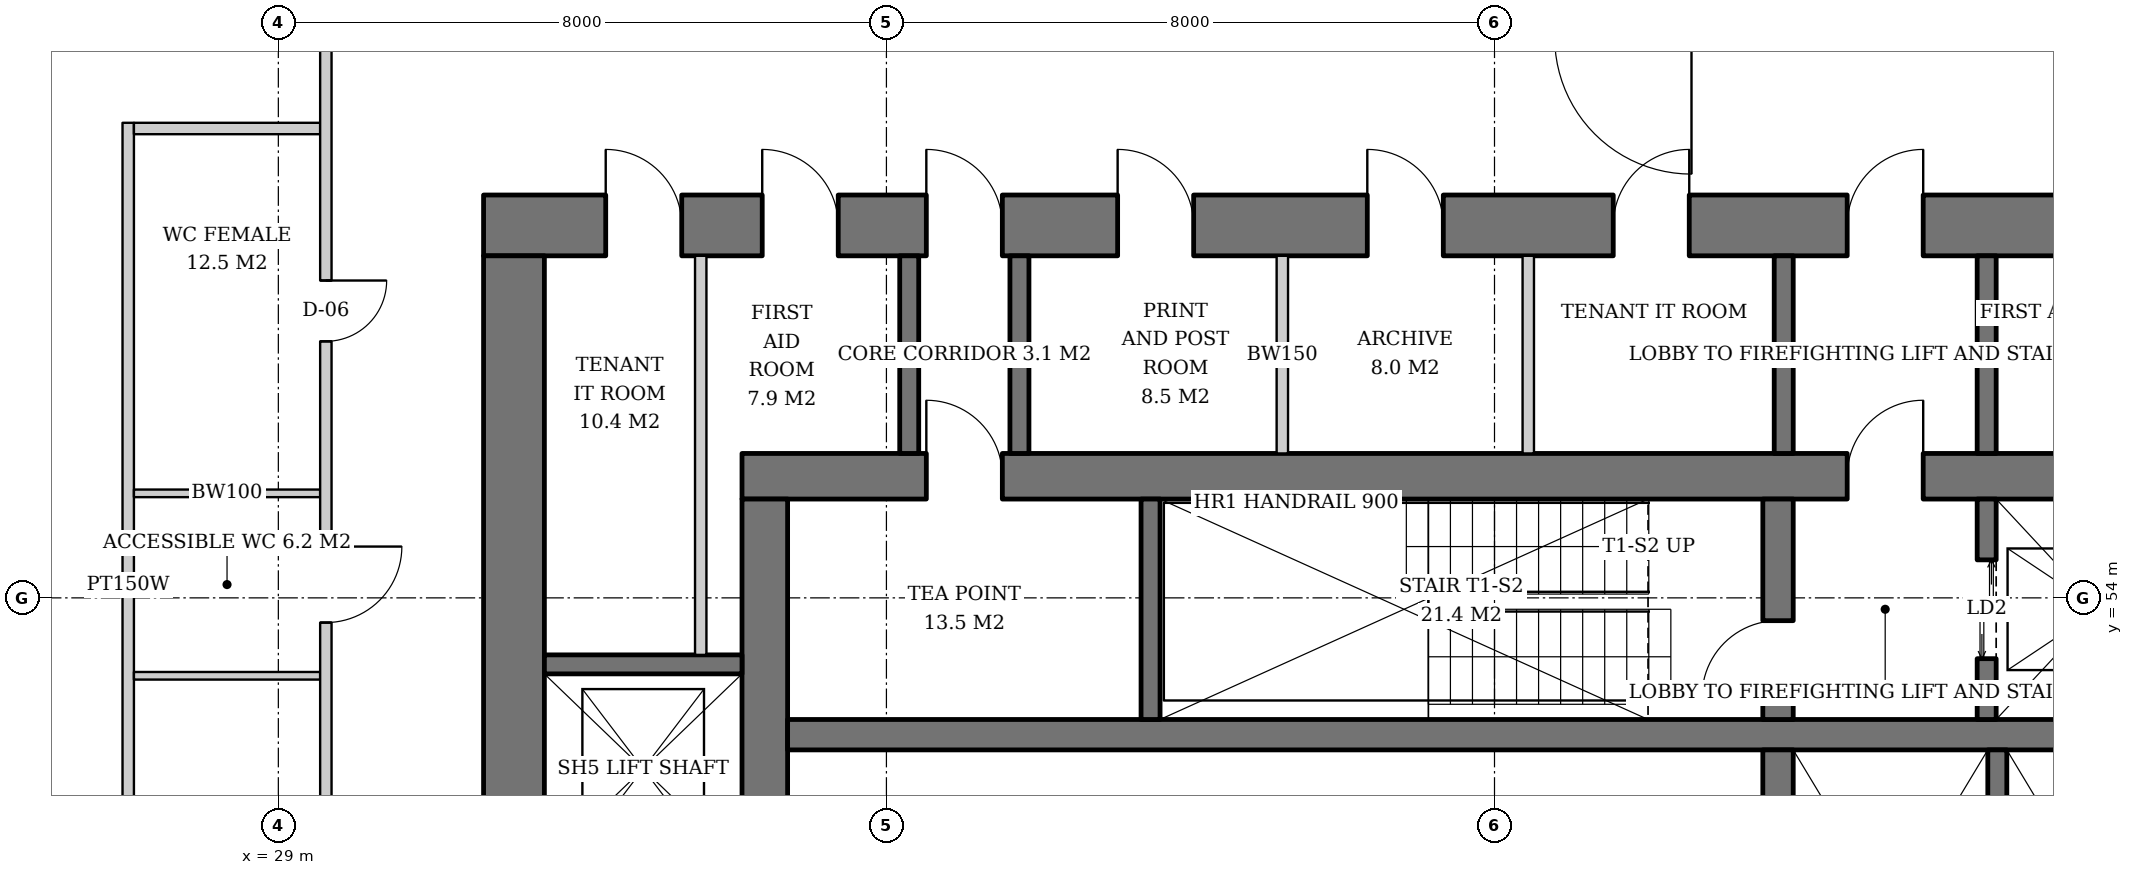
"""IFC4 building model, lengths in metres.
Left out: names, types, materials, properties, quantities, classifications, styles, units other than length and angle.
Written with IfcOpenShell. Run it as: python <this file> out.ifc"""

import sys

from ifc_helpers import new_model, si_unit, direction, frame, frame_2d, origin, place, context, subcontext, project, spatial, rectangle, extrude, element, fill, save


model = new_model("IFC4")
c1 = context("Model", 3, precision=1e-05, world=origin(), true_north=direction((0.0, 1.0)))
c2 = subcontext(c1, "Body", "Model", "MODEL_VIEW")
j1 = project(units=[si_unit("LENGTHUNIT", "METRE"), si_unit("PLANEANGLEUNIT", "RADIAN")], contexts=[c1])
p1 = place(None, origin())
s1 = spatial("IfcSite", under=j1, at=p1, CompositionType="ELEMENT")
p2 = place(p1, origin())
s2 = spatial("IfcBuilding", under=s1, at=p2, CompositionType="ELEMENT")
p3 = place(p2, frame((0.0, 0.0, 59.0)))
s3 = spatial("IfcBuildingStorey", under=s2, at=p3, CompositionType="ELEMENT", Elevation=59.0)
p4 = place(p3, frame((35.1, 55.6, 0.0), z_axis=(0.0, 0.0, 1.0), x_axis=(1.0, 0.0, 0.0)))
e1 = element("IfcWall", 1, at=p4, inside=s3, PredefinedType="SHEAR", context=c2, shape_type="SweptSolid", body=[
    extrude(rectangle(XDim=19.8, YDim=0.6, at=frame_2d((9.9, 0.0))), origin(), (0.0, 0.0, 1.0), 3.8),
])
p5 = place(p4, frame((14.54, 0.0, 0.0)))
e2 = element("IfcOpeningElement", 2, at=p5, cuts=e1, PredefinedType="OPENING", context=c2, shape_type="SweptSolid", body=[
    extrude(rectangle(XDim=1.0, YDim=2.1, at=frame_2d((0.5, 1.05))), frame((0.0, 0.31, 0.0), z_axis=(0.0, -1.0, 0.0), x_axis=(1.0, 0.0, 0.0)), (0.0, 0.0, 1.0), 0.62),
])
p6 = place(p4, frame((2.425, 0.0, 0.0)))
e3 = element("IfcOpeningElement", 3, at=p6, cuts=e1, PredefinedType="OPENING", context=c2, shape_type="SweptSolid", body=[
    extrude(rectangle(XDim=1.0, YDim=2.1, at=frame_2d((0.5, 1.05))), frame((0.0, 0.31, 0.0), z_axis=(0.0, -1.0, 0.0), x_axis=(1.0, 0.0, 0.0)), (0.0, 0.0, 1.0), 0.62),
])
p7 = place(p3, frame((35.4, 36.7, 0.0), z_axis=(0.0, 0.0, 1.0), x_axis=(0.0, 1.0, 0.0)))
e4 = element("IfcWall", 4, at=p7, inside=s3, PredefinedType="SHEAR", context=c2, shape_type="SweptSolid", body=[
    extrude(rectangle(XDim=18.6, YDim=0.6, at=frame_2d((9.3, 0.0))), origin(), (0.0, 0.0, 1.0), 3.8),
])
p8 = place(p7, frame((8.4, 0.0, 0.0)))
e5 = element("IfcOpeningElement", 5, at=p8, cuts=e4, PredefinedType="OPENING", context=c2, shape_type="SweptSolid", body=[
    extrude(rectangle(XDim=1.8, YDim=2.4, at=frame_2d((0.9, 1.2))), frame((0.0, 0.31, 0.0), z_axis=(0.0, -1.0, 0.0), x_axis=(1.0, 0.0, 0.0)), (0.0, 0.0, 1.0), 0.62),
])
p9 = place(p3, frame((31.7, 58.9, 0.0), z_axis=(0.0, 0.0, 1.0), x_axis=(1.0, 0.0, 0.0)))
e6 = element("IfcWall", 6, at=p9, inside=s3, PredefinedType="SHEAR", context=c2, shape_type="SweptSolid", body=[
    extrude(rectangle(XDim=26.6, YDim=0.8, at=frame_2d((13.3, 0.0))), origin(), (0.0, 0.0, 1.0), 3.8),
])
p10 = place(p9, frame((17.94, 0.0, 0.0)))
e7 = element("IfcOpeningElement", 7, at=p10, cuts=e6, PredefinedType="OPENING", context=c2, shape_type="SweptSolid", body=[
    extrude(rectangle(XDim=1.0, YDim=2.1, at=frame_2d((0.5, 1.05))), frame((0.0, 0.41, 0.0), z_axis=(0.0, -1.0, 0.0), x_axis=(1.0, 0.0, 0.0)), (0.0, 0.0, 1.0), 0.82),
])
p11 = place(p9, frame((5.825, 0.0, 0.0)))
e8 = element("IfcOpeningElement", 8, at=p11, cuts=e6, PredefinedType="OPENING", context=c2, shape_type="SweptSolid", body=[
    extrude(rectangle(XDim=1.0, YDim=2.1, at=frame_2d((0.5, 1.05))), frame((0.0, 0.41, 0.0), z_axis=(0.0, -1.0, 0.0), x_axis=(1.0, 0.0, 0.0)), (0.0, 0.0, 1.0), 0.82),
])
p12 = place(p9, frame((1.607, 0.0, 0.0)))
e9 = element("IfcOpeningElement", 9, at=p12, cuts=e6, PredefinedType="OPENING", context=c2, shape_type="SweptSolid", body=[
    extrude(rectangle(XDim=1.0, YDim=2.1, at=frame_2d((0.5, 1.05))), frame((0.0, 0.41, 0.0), z_axis=(0.0, -1.0, 0.0), x_axis=(1.0, 0.0, 0.0)), (0.0, 0.0, 1.0), 0.82),
])
p13 = place(p9, frame((3.666, 0.0, 0.0)))
e10 = element("IfcOpeningElement", 10, at=p13, cuts=e6, PredefinedType="OPENING", context=c2, shape_type="SweptSolid", body=[
    extrude(rectangle(XDim=1.0, YDim=2.1, at=frame_2d((0.5, 1.05))), frame((0.0, 0.41, 0.0), z_axis=(0.0, -1.0, 0.0), x_axis=(1.0, 0.0, 0.0)), (0.0, 0.0, 1.0), 0.82),
])
p14 = place(p9, frame((8.342, 0.0, 0.0)))
e11 = element("IfcOpeningElement", 11, at=p14, cuts=e6, PredefinedType="OPENING", context=c2, shape_type="SweptSolid", body=[
    extrude(rectangle(XDim=1.0, YDim=2.1, at=frame_2d((0.5, 1.05))), frame((0.0, 0.41, 0.0), z_axis=(0.0, -1.0, 0.0), x_axis=(1.0, 0.0, 0.0)), (0.0, 0.0, 1.0), 0.82),
])
p15 = place(p9, frame((11.626, 0.0, 0.0)))
e12 = element("IfcOpeningElement", 12, at=p15, cuts=e6, PredefinedType="OPENING", context=c2, shape_type="SweptSolid", body=[
    extrude(rectangle(XDim=1.0, YDim=2.1, at=frame_2d((0.5, 1.05))), frame((0.0, 0.41, 0.0), z_axis=(0.0, -1.0, 0.0), x_axis=(1.0, 0.0, 0.0)), (0.0, 0.0, 1.0), 0.82),
])
p16 = place(p9, frame((14.862, 0.0, 0.0)))
e13 = element("IfcOpeningElement", 13, at=p16, cuts=e6, PredefinedType="OPENING", context=c2, shape_type="SweptSolid", body=[
    extrude(rectangle(XDim=1.0, YDim=2.1, at=frame_2d((0.5, 1.05))), frame((0.0, 0.41, 0.0), z_axis=(0.0, -1.0, 0.0), x_axis=(1.0, 0.0, 0.0)), (0.0, 0.0, 1.0), 0.82),
])
p17 = place(p9, frame((20.875, 0.0, 0.0)))
e14 = element("IfcOpeningElement", 14, at=p17, cuts=e6, PredefinedType="OPENING", context=c2, shape_type="SweptSolid", body=[
    extrude(rectangle(XDim=1.0, YDim=2.1, at=frame_2d((0.5, 1.05))), frame((0.0, 0.41, 0.0), z_axis=(0.0, -1.0, 0.0), x_axis=(1.0, 0.0, 0.0)), (0.0, 0.0, 1.0), 0.82),
])
p18 = place(p9, frame((23.7, 0.0, 0.0)))
e15 = element("IfcOpeningElement", 15, at=p18, cuts=e6, PredefinedType="OPENING", context=c2, shape_type="SweptSolid", body=[
    extrude(rectangle(XDim=1.0, YDim=2.1, at=frame_2d((0.5, 1.05))), frame((0.0, 0.41, 0.0), z_axis=(0.0, -1.0, 0.0), x_axis=(1.0, 0.0, 0.0)), (0.0, 0.0, 1.0), 0.82),
])
p19 = place(p3, frame((32.1, 33.5, 0.0), z_axis=(0.0, 0.0, 1.0), x_axis=(0.0, 1.0, 0.0)))
e16 = element("IfcWall", 16, at=p19, inside=s3, PredefinedType="SHEAR", context=c2, shape_type="SweptSolid", body=[
    extrude(rectangle(XDim=25.0, YDim=0.8, at=frame_2d((12.5, 0.0))), origin(), (0.0, 0.0, 1.0), 3.8),
])
p20 = place(p19, frame((11.6, 0.0, 0.0)))
e17 = element("IfcOpeningElement", 17, at=p20, cuts=e16, PredefinedType="OPENING", context=c2, shape_type="SweptSolid", body=[
    extrude(rectangle(XDim=1.8, YDim=2.4, at=frame_2d((0.9, 1.2))), frame((0.0, 0.41, 0.0), z_axis=(0.0, -1.0, 0.0), x_axis=(1.0, 0.0, 0.0)), (0.0, 0.0, 1.0), 0.82),
])
p21 = place(p3, frame((35.7, 52.2, 0.0), z_axis=(0.0, 0.0, 1.0), x_axis=(1.0, 0.0, 0.0)))
e18 = element("IfcWall", 18, at=p21, inside=s3, PredefinedType="SHEAR", context=c2, shape_type="SweptSolid", body=[
    extrude(rectangle(XDim=18.6, YDim=0.4, at=frame_2d((9.3, 0.0))), origin(), (0.0, 0.0, 1.0), 3.8),
])
p22 = place(p3, frame((48.73, 40.0, 0.0), z_axis=(0.0, 0.0, 1.0), x_axis=(0.0, 1.0, 0.0)))
e19 = element("IfcWall", 19, at=p22, inside=s3, PredefinedType="SHEAR", context=c2, shape_type="SweptSolid", body=[
    extrude(rectangle(XDim=12.0, YDim=0.4, at=frame_2d((6.0, 0.0))), origin(), (0.0, 0.0, 1.0), 3.8),
])
p23 = place(p3, frame((48.73, 52.4, 0.0), z_axis=(0.0, 0.0, 1.0), x_axis=(0.0, 1.0, 0.0)))
e20 = element("IfcWall", 20, at=p23, inside=s3, PredefinedType="SHEAR", context=c2, shape_type="SweptSolid", body=[
    extrude(rectangle(XDim=2.9, YDim=0.4, at=frame_2d((1.45, 0.0))), origin(), (0.0, 0.0, 1.0), 3.8),
])
p24 = place(p23, frame((0.3, 0.0, 0.0)))
e21 = element("IfcOpeningElement", 21, at=p24, cuts=e20, PredefinedType="OPENING", context=c2, shape_type="SweptSolid", body=[
    extrude(rectangle(XDim=1.0, YDim=2.1, at=frame_2d((0.5, 1.05))), frame((0.0, 0.21, 0.0), z_axis=(0.0, -1.0, 0.0), x_axis=(1.0, 0.0, 0.0)), (0.0, 0.0, 1.0), 0.42),
])
p25 = place(p3, frame((40.475, 52.4, 0.0), z_axis=(0.0, 0.0, 1.0), x_axis=(0.0, 1.0, 0.0)))
e22 = element("IfcWall", 22, at=p25, inside=s3, PredefinedType="SHEAR", context=c2, shape_type="SweptSolid", body=[
    extrude(rectangle(XDim=2.9, YDim=0.25, at=frame_2d((1.45, 0.0))), origin(), (0.0, 0.0, 1.0), 3.8),
])
p26 = place(p3, frame((51.475, 52.4, 0.0), z_axis=(0.0, 0.0, 1.0), x_axis=(0.0, 1.0, 0.0)))
e23 = element("IfcWall", 23, at=p26, inside=s3, PredefinedType="SHEAR", context=c2, shape_type="SweptSolid", body=[
    extrude(rectangle(XDim=2.9, YDim=0.25, at=frame_2d((1.45, 0.0))), origin(), (0.0, 0.0, 1.0), 3.8),
])
p27 = place(p26, frame((0.8, 0.0, 0.0)))
e24 = element("IfcOpeningElement", 24, at=p27, cuts=e23, PredefinedType="OPENING", context=c2, shape_type="SweptSolid", body=[
    extrude(rectangle(XDim=1.3, YDim=2.2, at=frame_2d((0.65, 1.1))), frame((0.0, 0.135, 0.0), z_axis=(0.0, -1.0, 0.0), x_axis=(1.0, 0.0, 0.0)), (0.0, 0.0, 1.0), 0.27),
])
p28 = place(p3, frame((51.615, 47.75, 0.0), z_axis=(0.0, 0.0, 1.0), x_axis=(0.0, 1.0, 0.0)))
e25 = element("IfcWall", 25, at=p28, inside=s3, PredefinedType="SHEAR", context=c2, shape_type="SweptSolid", body=[
    extrude(rectangle(XDim=4.25, YDim=0.25, at=frame_2d((2.125, 0.0))), origin(), (0.0, 0.0, 1.0), 3.8),
])
p29 = place(p3, frame((32.5, 53.125, 0.0), z_axis=(0.0, 0.0, 1.0), x_axis=(1.0, 0.0, 0.0)))
e26 = element("IfcWall", 26, at=p29, inside=s3, PredefinedType="SHEAR", context=c2, shape_type="SweptSolid", body=[
    extrude(rectangle(XDim=2.6, YDim=0.25, at=frame_2d((1.3, 0.0))), origin(), (0.0, 0.0, 1.0), 3.8),
])
for number, where, z_axis, x_axis in (
    (27, (48.805, 55.9, 0.0), (0.0, 0.0, 1.0), (0.0, 1.0, 0.0)),
    (28, (51.475, 55.9, 0.0), (0.0, 0.0, 1.0), (0.0, 1.0, 0.0)),
    (29, (37.3, 55.9, 0.0), (0.0, 0.0, 1.0), (0.0, 1.0, 0.0)),
    (30, (38.75, 55.9, 0.0), (0.0, 0.0, 1.0), (0.0, 1.0, 0.0)),
):
    element("IfcWall", number, at=place(p3, frame(where, z_axis=z_axis, x_axis=x_axis)), inside=s3, PredefinedType="SOLIDWALL", context=c2, shape_type="SweptSolid", body=[
        extrude(rectangle(XDim=2.6, YDim=0.25, at=frame_2d((1.3, 0.0))), origin(), (0.0, 0.0, 1.0), 3.62),
    ])
p30 = place(p3, frame((34.557, 53.25, 0.0), z_axis=(0.0, 0.0, 1.0), x_axis=(0.0, 1.0, 0.0)))
e31 = element("IfcWall", 31, at=p30, inside=s3, PredefinedType="SOLIDWALL", context=c2, shape_type="SweptSolid", body=[
    extrude(rectangle(XDim=5.25, YDim=0.15, at=frame_2d((2.625, 0.0))), origin(), (0.0, 0.0, 1.0), 3.62),
])
for number, where, z_axis, x_axis in (
    (32, (42.209, 55.9, 0.0), (0.0, 0.0, 1.0), (0.0, 1.0, 0.0)),
    (33, (45.444, 55.9, 0.0), (0.0, 0.0, 1.0), (0.0, 1.0, 0.0)),
):
    element("IfcWall", number, at=place(p3, frame(where, z_axis=z_axis, x_axis=x_axis)), inside=s3, PredefinedType="SOLIDWALL", context=c2, shape_type="SweptSolid", body=[
        extrude(rectangle(XDim=2.6, YDim=0.15, at=frame_2d((1.3, 0.0))), origin(), (0.0, 0.0, 1.0), 3.62),
    ])
p31 = place(p3, frame((27.025, 60.25, 0.0), z_axis=(0.0, 0.0, 1.0), x_axis=(0.0, -1.0, 0.0)))
e34 = element("IfcWall", 34, at=p31, inside=s3, PredefinedType="PARTITIONING", context=c2, shape_type="SweptSolid", body=[
    extrude(rectangle(XDim=12.15, YDim=0.15, at=frame_2d((6.075, 0.0))), origin(), (0.0, 0.0, 1.0), 2.612),
])
p32 = place(p3, frame((29.55, 60.175, 0.0), z_axis=(0.0, 0.0, 1.0), x_axis=(-1.0, 0.0, 0.0)))
e35 = element("IfcWall", 35, at=p32, inside=s3, PredefinedType="PARTITIONING", context=c2, shape_type="SweptSolid", body=[
    extrude(rectangle(XDim=2.45, YDim=0.15, at=frame_2d((1.225, 0.0))), origin(), (0.0, 0.0, 1.0), 3.62),
])
for number, where, z_axis, x_axis in (
    (36, (29.55, 55.375, 0.0), (0.0, 0.0, 1.0), (-1.0, 0.0, 0.0)),
    (37, (29.55, 52.975, 0.0), (0.0, 0.0, 1.0), (-1.0, 0.0, 0.0)),
):
    element("IfcWall", number, at=place(p3, frame(where, z_axis=z_axis, x_axis=x_axis)), inside=s3, PredefinedType="SOLIDWALL", context=c2, shape_type="SweptSolid", body=[
        extrude(rectangle(XDim=2.45, YDim=0.1, at=frame_2d((1.225, 0.0))), origin(), (0.0, 0.0, 1.0), 3.62),
    ])
p33 = place(p3, frame((29.625, 61.45, 0.0), z_axis=(0.0, 0.0, 1.0), x_axis=(0.0, -1.0, 0.0)))
e38 = element("IfcWall", 38, at=p33, inside=s3, PredefinedType="PARTITIONING", context=c2, shape_type="SweptSolid", body=[
    extrude(rectangle(XDim=30.75, YDim=0.15, at=frame_2d((15.375, 0.0))), origin(), (0.0, 0.0, 1.0), 2.612),
])
p34 = place(p33, frame((3.275, 0.0, 0.0)))
e39 = element("IfcOpeningElement", 39, at=p34, cuts=e38, PredefinedType="OPENING", context=c2, shape_type="SweptSolid", body=[
    extrude(rectangle(XDim=0.8, YDim=2.1, at=frame_2d((0.4, 1.05))), frame((0.0, 0.085, 0.0), z_axis=(0.0, -1.0, 0.0), x_axis=(1.0, 0.0, 0.0)), (0.0, 0.0, 1.0), 0.17),
])
p35 = place(p33, frame((6.775, 0.0, 0.0)))
e40 = element("IfcOpeningElement", 40, at=p35, cuts=e38, PredefinedType="OPENING", context=c2, shape_type="SweptSolid", body=[
    extrude(rectangle(XDim=1.0, YDim=2.1, at=frame_2d((0.5, 1.05))), frame((0.0, 0.085, 0.0), z_axis=(0.0, -1.0, 0.0), x_axis=(1.0, 0.0, 0.0)), (0.0, 0.0, 1.0), 0.17),
])
p36 = place(p33, frame((10.475, 0.0, 0.0)))
e41 = element("IfcOpeningElement", 41, at=p36, cuts=e38, PredefinedType="OPENING", context=c2, shape_type="SweptSolid", body=[
    extrude(rectangle(XDim=0.8, YDim=2.1, at=frame_2d((0.4, 1.05))), frame((0.0, 0.085, 0.0), z_axis=(0.0, -1.0, 0.0), x_axis=(1.0, 0.0, 0.0)), (0.0, 0.0, 1.0), 0.17),
])
p37 = place(p27, origin())
e42 = element("IfcDoor", 42, at=p37, inside=s3, OperationType="DOUBLE_DOOR_SLIDING", PredefinedType="DOOR", context=c2, shape_type="SweptSolid", body=[
    extrude(rectangle(XDim=1.3, YDim=2.2, at=frame_2d((0.65, 1.1))), frame((0.0, 0.025, 0.0), z_axis=(0.0, -1.0, 0.0), x_axis=(1.0, 0.0, 0.0)), (0.0, 0.0, 1.0), 0.05),
])
fill(e24, e42)
p38 = place(p24, origin())
e43 = element("IfcDoor", 43, at=p38, inside=s3, OperationType="SINGLE_SWING_LEFT", PredefinedType="DOOR", context=c2, shape_type="SweptSolid", body=[
    extrude(rectangle(XDim=1.0, YDim=2.1, at=frame_2d((0.5, 1.05))), frame((0.0, 0.025, 0.0), z_axis=(0.0, -1.0, 0.0), x_axis=(1.0, 0.0, 0.0)), (0.0, 0.0, 1.0), 0.05),
])
fill(e21, e43)
p39 = place(p5, origin())
e44 = element("IfcDoor", 44, at=p39, inside=s3, OperationType="SINGLE_SWING_RIGHT", PredefinedType="DOOR", context=c2, shape_type="SweptSolid", body=[
    extrude(rectangle(XDim=1.0, YDim=2.1, at=frame_2d((0.5, 1.05))), frame((0.0, 0.025, 0.0), z_axis=(0.0, -1.0, 0.0), x_axis=(1.0, 0.0, 0.0)), (0.0, 0.0, 1.0), 0.05),
])
fill(e2, e44)
p40 = place(p10, origin())
e45 = element("IfcDoor", 45, at=p40, inside=s3, OperationType="SINGLE_SWING_RIGHT", PredefinedType="DOOR", context=c2, shape_type="SweptSolid", body=[
    extrude(rectangle(XDim=1.0, YDim=2.1, at=frame_2d((0.5, 1.05))), frame((0.0, 0.025, 0.0), z_axis=(0.0, -1.0, 0.0), x_axis=(1.0, 0.0, 0.0)), (0.0, 0.0, 1.0), 0.05),
])
fill(e7, e45)
p41 = place(p11, origin())
e46 = element("IfcDoor", 46, at=p41, inside=s3, OperationType="SINGLE_SWING_LEFT", PredefinedType="DOOR", context=c2, shape_type="SweptSolid", body=[
    extrude(rectangle(XDim=1.0, YDim=2.1, at=frame_2d((0.5, 1.05))), frame((0.0, 0.025, 0.0), z_axis=(0.0, -1.0, 0.0), x_axis=(1.0, 0.0, 0.0)), (0.0, 0.0, 1.0), 0.05),
])
fill(e8, e46)
p42 = place(p6, origin())
e47 = element("IfcDoor", 47, at=p42, inside=s3, OperationType="SINGLE_SWING_LEFT", PredefinedType="DOOR", context=c2, shape_type="SweptSolid", body=[
    extrude(rectangle(XDim=1.0, YDim=2.1, at=frame_2d((0.5, 1.05))), frame((0.0, -0.24, 0.0), z_axis=(0.0, -1.0, 0.0), x_axis=(1.0, 0.0, 0.0)), (0.0, 0.0, 1.0), 0.05),
])
fill(e3, e47)
p43 = place(p12, origin())
e48 = element("IfcDoor", 48, at=p43, inside=s3, OperationType="SINGLE_SWING_LEFT", PredefinedType="DOOR", context=c2, shape_type="SweptSolid", body=[
    extrude(rectangle(XDim=1.0, YDim=2.1, at=frame_2d((0.5, 1.05))), frame((0.0, -0.34, 0.0), z_axis=(0.0, -1.0, 0.0), x_axis=(1.0, 0.0, 0.0)), (0.0, 0.0, 1.0), 0.05),
])
fill(e9, e48)
p44 = place(p13, origin())
e49 = element("IfcDoor", 49, at=p44, inside=s3, OperationType="SINGLE_SWING_LEFT", PredefinedType="DOOR", context=c2, shape_type="SweptSolid", body=[
    extrude(rectangle(XDim=1.0, YDim=2.1, at=frame_2d((0.5, 1.05))), frame((0.0, -0.34, 0.0), z_axis=(0.0, -1.0, 0.0), x_axis=(1.0, 0.0, 0.0)), (0.0, 0.0, 1.0), 0.05),
])
fill(e10, e49)
p45 = place(p14, origin())
e50 = element("IfcDoor", 50, at=p45, inside=s3, OperationType="SINGLE_SWING_LEFT", PredefinedType="DOOR", context=c2, shape_type="SweptSolid", body=[
    extrude(rectangle(XDim=1.0, YDim=2.1, at=frame_2d((0.5, 1.05))), frame((0.0, -0.34, 0.0), z_axis=(0.0, -1.0, 0.0), x_axis=(1.0, 0.0, 0.0)), (0.0, 0.0, 1.0), 0.05),
])
fill(e11, e50)
p46 = place(p15, origin())
e51 = element("IfcDoor", 51, at=p46, inside=s3, OperationType="SINGLE_SWING_LEFT", PredefinedType="DOOR", context=c2, shape_type="SweptSolid", body=[
    extrude(rectangle(XDim=1.0, YDim=2.1, at=frame_2d((0.5, 1.05))), frame((0.0, -0.34, 0.0), z_axis=(0.0, -1.0, 0.0), x_axis=(1.0, 0.0, 0.0)), (0.0, 0.0, 1.0), 0.05),
])
fill(e12, e51)
p47 = place(p16, origin())
e52 = element("IfcDoor", 52, at=p47, inside=s3, OperationType="SINGLE_SWING_RIGHT", PredefinedType="DOOR", context=c2, shape_type="SweptSolid", body=[
    extrude(rectangle(XDim=1.0, YDim=2.1, at=frame_2d((0.5, 1.05))), frame((0.0, -0.34, 0.0), z_axis=(0.0, -1.0, 0.0), x_axis=(1.0, 0.0, 0.0)), (0.0, 0.0, 1.0), 0.05),
])
fill(e13, e52)
p48 = place(p34, origin())
e53 = element("IfcDoor", 53, at=p48, inside=s3, OperationType="SINGLE_SWING_LEFT", PredefinedType="DOOR", context=c2, shape_type="SweptSolid", body=[
    extrude(rectangle(XDim=0.8, YDim=2.1, at=frame_2d((0.4, 1.05))), frame((0.0, 0.025, 0.0), z_axis=(0.0, -1.0, 0.0), x_axis=(1.0, 0.0, 0.0)), (0.0, 0.0, 1.0), 0.05),
])
fill(e39, e53)
p49 = place(p35, origin())
e54 = element("IfcDoor", 54, at=p49, inside=s3, OperationType="SINGLE_SWING_LEFT", PredefinedType="DOOR", context=c2, shape_type="SweptSolid", body=[
    extrude(rectangle(XDim=1.0, YDim=2.1, at=frame_2d((0.5, 1.05))), frame((0.0, 0.025, 0.0), z_axis=(0.0, -1.0, 0.0), x_axis=(1.0, 0.0, 0.0)), (0.0, 0.0, 1.0), 0.05),
])
fill(e40, e54)
save(model, sys.argv[1])
